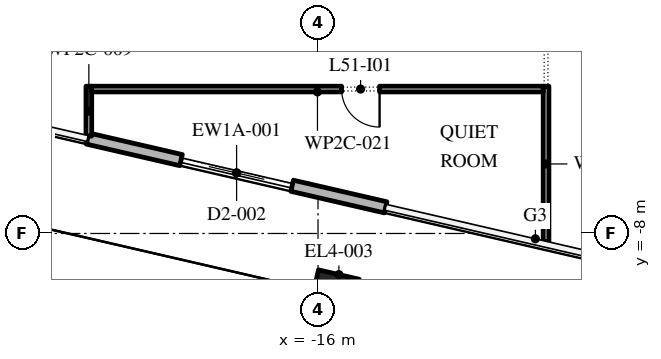
"""IFC4 building model, lengths in metres.
Left out: names, types, materials, properties, quantities, classifications, styles, units other than length and angle.
Written with IfcOpenShell. Run it as: python <this file> out.ifc"""

import sys

from ifc_helpers import new_model, si_unit, direction, frame, frame_2d, origin, origin_2d, place, context, subcontext, project, spatial, rectangle, extrude, element, fill, save


model = new_model("IFC4")
c1 = context("Model", 3, precision=1e-05, world=origin(), true_north=direction((0.0, 1.0)))
c2 = subcontext(c1, "Body", "Model", "MODEL_VIEW")
j1 = project(units=[si_unit("LENGTHUNIT", "METRE"), si_unit("PLANEANGLEUNIT", "RADIAN")], contexts=[c1])
p1 = place(None, origin())
s1 = spatial("IfcSite", under=j1, at=p1, CompositionType="ELEMENT")
p2 = place(p1, origin())
s2 = spatial("IfcBuilding", under=s1, at=p2, CompositionType="ELEMENT")
p3 = place(p2, frame((0.0, 0.0, 237.0)))
s3 = spatial("IfcBuildingStorey", under=s2, at=p3, CompositionType="ELEMENT", Elevation=237.0)
p4 = place(p3, frame((-15.574, -9.617, 0.0), z_axis=(0.0, 0.0, 1.0), x_axis=(0.974370064785, -0.224951054344, 0.0)))
e1 = element("IfcColumn", 1, at=p4, inside=s3, PredefinedType="COLUMN", context=c2, shape_type="SweptSolid", body=[
    extrude(rectangle(XDim=1.1, YDim=1.1, at=origin_2d()), origin(), (0.0, 0.0, 1.0), 6.0),
])
p5 = place(p3, frame((-22.065, -5.502, 0.0), z_axis=(0.0, 0.0, 1.0), x_axis=(0.974372279954, -0.224941459176, 0.0)))
e2 = element("IfcWall", 2, at=p5, inside=s3, PredefinedType="STANDARD", context=c2, shape_type="SweptSolid", body=[
    extrude(rectangle(XDim=8.05, YDim=0.3, at=frame_2d((4.025, 0.0))), origin(), (0.0, 0.0, 1.0), 5.8),
])
p6 = place(p5, frame((2.525, 0.0, 0.0)))
e3 = element("IfcOpeningElement", 3, at=p6, cuts=e2, PredefinedType="OPENING", context=c2, shape_type="SweptSolid", body=[
    extrude(rectangle(XDim=3.0, YDim=3.5, at=frame_2d((1.5, 1.75))), frame((0.0, 0.16, 0.0), z_axis=(0.0, -1.0, 0.0), x_axis=(1.0, 0.0, 0.0)), (0.0, 0.0, 1.0), 0.32),
])
p7 = place(p3, frame((-22.03, -4.125, 0.0), z_axis=(0.0, 0.0, 1.0), x_axis=(0.0, -1.0, 0.0)))
e4 = element("IfcWall", 4, at=p7, inside=s3, PredefinedType="PARTITIONING", context=c2, shape_type="SweptSolid", body=[
    extrude(rectangle(XDim=1.313, YDim=0.15, at=frame_2d((0.656, 0.0))), origin(), (0.0, 0.0, 1.0), 5.8),
])
p8 = place(p3, frame((-10.0, -8.216, 0.0), z_axis=(0.0, 0.0, 1.0), x_axis=(0.0, 1.0, 0.0)))
e5 = element("IfcWall", 5, at=p8, inside=s3, PredefinedType="PARTITIONING", context=c2, shape_type="SweptSolid", body=[
    extrude(rectangle(XDim=4.091, YDim=0.15, at=frame_2d((2.045, 0.0))), origin(), (0.0, 0.0, 1.0), 5.394),
])
p9 = place(p3, frame((-10.075, -4.2, 0.0), z_axis=(0.0, 0.0, 1.0), x_axis=(-1.0, 0.0, 0.0)))
e6 = element("IfcWall", 6, at=p9, inside=s3, PredefinedType="PARTITIONING", context=c2, shape_type="SweptSolid", body=[
    extrude(rectangle(XDim=11.88, YDim=0.15, at=frame_2d((5.94, 0.0))), origin(), (0.0, 0.0, 1.0), 5.8),
])
p10 = place(p9, frame((4.305, 0.0, 0.0)))
e7 = element("IfcOpeningElement", 7, at=p10, cuts=e6, PredefinedType="OPENING", context=c2, shape_type="SweptSolid", body=[
    extrude(rectangle(XDim=1.0, YDim=2.1, at=frame_2d((0.5, 1.05))), frame((0.0, 0.085, 0.0), z_axis=(0.0, -1.0, 0.0), x_axis=(1.0, 0.0, 0.0)), (0.0, 0.0, 1.0), 0.17),
])
p11 = place(p6, origin())
e8 = element("IfcDoor", 8, at=p11, inside=s3, OperationType="DOUBLE_DOOR_SLIDING", PredefinedType="DOOR", context=c2, shape_type="SweptSolid", body=[
    extrude(rectangle(XDim=3.0, YDim=3.5, at=frame_2d((1.5, 1.75))), frame((0.0, 0.025, 0.0), z_axis=(0.0, -1.0, 0.0), x_axis=(1.0, 0.0, 0.0)), (0.0, 0.0, 1.0), 0.05),
])
fill(e3, e8)
p12 = place(p10, origin())
e9 = element("IfcDoor", 9, at=p12, inside=s3, OperationType="SINGLE_SWING_RIGHT", PredefinedType="DOOR", context=c2, shape_type="SweptSolid", body=[
    extrude(rectangle(XDim=1.0, YDim=2.1, at=frame_2d((0.5, 1.05))), frame((0.0, 0.025, 0.0), z_axis=(0.0, -1.0, 0.0), x_axis=(1.0, 0.0, 0.0)), (0.0, 0.0, 1.0), 0.05),
])
fill(e7, e9)
save(model, sys.argv[1])
